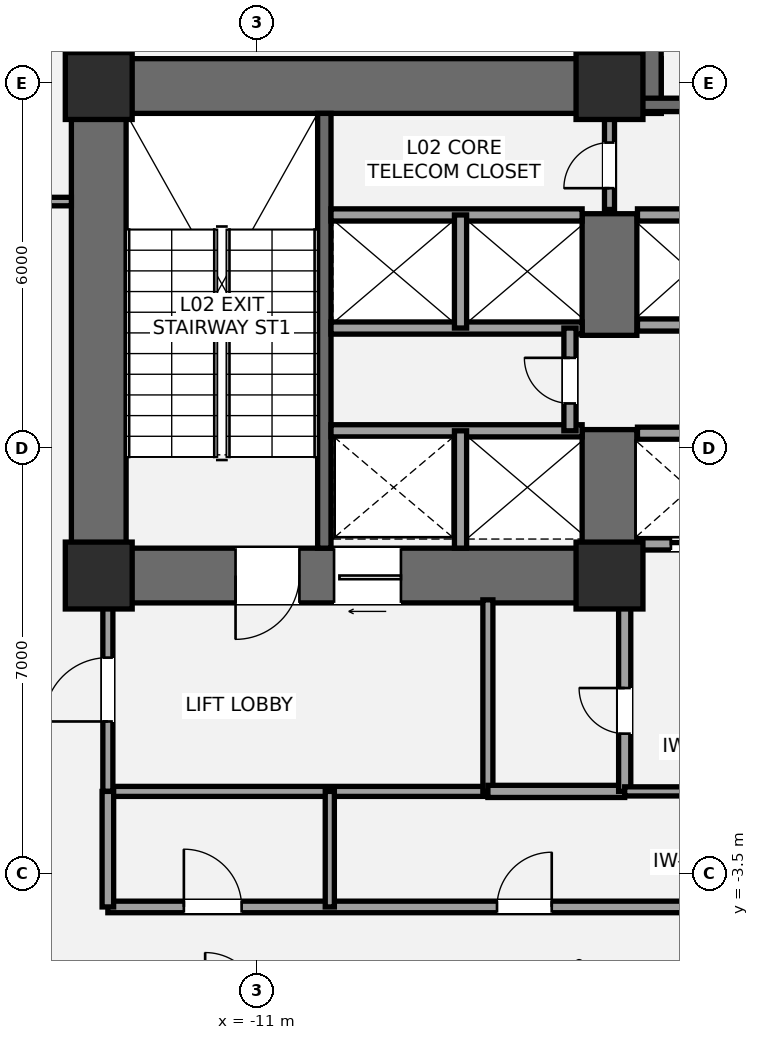
"""IFC4 building model, lengths in metres.
Left out: names, types, materials, properties, quantities, classifications, styles, units other than length and angle.
Written with IfcOpenShell. Run it as: python <this file> out.ifc"""

import sys

from ifc_helpers import new_model, si_unit, direction, frame, frame_2d, origin, origin_2d, place, context, subcontext, project, spatial, rectangle, extrude, element, fill, save


model = new_model("IFC4")
c1 = context("Model", 3, precision=1e-05, world=origin(), true_north=direction((0.0, 1.0)))
c2 = subcontext(c1, "Body", "Model", "MODEL_VIEW")
j1 = project(units=[si_unit("LENGTHUNIT", "METRE"), si_unit("PLANEANGLEUNIT", "RADIAN")], contexts=[c1])
p1 = place(None, origin())
s1 = spatial("IfcSite", under=j1, at=p1, CompositionType="ELEMENT")
p2 = place(p1, origin())
s2 = spatial("IfcBuilding", under=s1, at=p2, CompositionType="ELEMENT")
p3 = place(p2, frame((0.0, 0.0, 10.2)))
s3 = spatial("IfcBuildingStorey", under=s2, at=p3, CompositionType="ELEMENT", Elevation=10.2)
p4 = place(p3, frame((-13.6, 0.95, 0.0), z_axis=(0.0, 0.0, 1.0), x_axis=(0.0, 1.0, 0.0)))
e1 = element("IfcWall", 1, at=p4, inside=s3, PredefinedType="SHEAR", context=c2, shape_type="SweptSolid", body=[
    extrude(rectangle(XDim=8.95, YDim=0.9, at=frame_2d((4.475, 0.0))), origin(), (0.0, 0.0, 1.0), 4.2),
])
p5 = place(p3, frame((-14.05, 9.45, 0.0), z_axis=(0.0, 0.0, 1.0), x_axis=(1.0, 0.0, 0.0)))
e2 = element("IfcWall", 2, at=p5, inside=s3, PredefinedType="SHEAR", context=c2, shape_type="SweptSolid", body=[
    extrude(rectangle(XDim=9.7, YDim=0.9, at=frame_2d((4.85, 0.0))), origin(), (0.0, 0.0, 1.0), 4.2),
])
p6 = place(p3, frame((-4.75, 1.4, 0.0), z_axis=(0.0, 0.0, 1.0), x_axis=(-1.0, 0.0, 0.0)))
e3 = element("IfcWall", 3, at=p6, inside=s3, PredefinedType="SHEAR", context=c2, shape_type="SweptSolid", body=[
    extrude(rectangle(XDim=9.3, YDim=0.9, at=frame_2d((4.65, 0.0))), origin(), (0.0, 0.0, 1.0), 4.2),
])
p7 = place(p6, frame((5.55, 0.0, 0.0)))
e4 = element("IfcOpeningElement", 4, at=p7, cuts=e3, PredefinedType="OPENING", context=c2, shape_type="SweptSolid", body=[
    extrude(rectangle(XDim=1.05, YDim=2.15, at=frame_2d((0.525, 1.075))), frame((0.0, 0.46, 0.0), z_axis=(0.0, -1.0, 0.0), x_axis=(1.0, 0.0, 0.0)), (0.0, 0.0, 1.0), 0.92),
])
p8 = place(p6, frame((3.88, 0.0, 0.0)))
e5 = element("IfcOpeningElement", 5, at=p8, cuts=e3, PredefinedType="OPENING", context=c2, shape_type="SweptSolid", body=[
    extrude(rectangle(XDim=1.1, YDim=2.2, at=frame_2d((0.55, 1.1))), frame((0.0, 0.46, 0.0), z_axis=(0.0, -1.0, 0.0), x_axis=(1.0, 0.0, 0.0)), (0.0, 0.0, 1.0), 0.92),
])
p9 = place(p3, frame((-5.2, 0.95, 0.0), z_axis=(0.0, 0.0, 1.0), x_axis=(0.0, 1.0, 0.0)))
e6 = element("IfcWall", 6, at=p9, inside=s3, PredefinedType="SHEAR", context=c2, shape_type="SweptSolid", body=[
    extrude(rectangle(XDim=2.85, YDim=0.9, at=frame_2d((1.425, 0.0))), origin(), (0.0, 0.0, 1.0), 4.2),
])
p10 = place(p3, frame((-5.2, 5.35, 0.0), z_axis=(0.0, 0.0, 1.0), x_axis=(0.0, 1.0, 0.0)))
e7 = element("IfcWall", 7, at=p10, inside=s3, PredefinedType="SHEAR", context=c2, shape_type="SweptSolid", body=[
    extrude(rectangle(XDim=2.0, YDim=0.9, at=frame_2d((1.0, 0.0))), origin(), (0.0, 0.0, 1.0), 4.2),
])
p11 = place(p3, frame((-9.89, 1.85, 0.0), z_axis=(0.0, 0.0, 1.0), x_axis=(0.0, 1.0, 0.0)))
e8 = element("IfcWall", 8, at=p11, inside=s3, PredefinedType="SHEAR", context=c2, shape_type="SweptSolid", body=[
    extrude(rectangle(XDim=7.15, YDim=0.22, at=frame_2d((3.575, 0.0))), origin(), (0.0, 0.0, 1.0), 4.2),
])
p12 = place(p3, frame((-4.8, 9.0, 0.0), z_axis=(0.0, 0.0, 1.0), x_axis=(0.0, 1.0, 0.0)))
e9 = element("IfcWall", 9, at=p12, inside=s3, PredefinedType="SHEAR", context=c2, shape_type="SweptSolid", body=[
    extrude(rectangle(XDim=4.3, YDim=0.9, at=frame_2d((2.15, 0.0))), origin(), (0.0, 0.0, 1.0), 4.2),
])
p13 = place(p3, frame((-4.7, 9.14, 0.0), z_axis=(0.0, 0.0, 1.0), x_axis=(1.0, 0.0, 0.0)))
e10 = element("IfcWall", 10, at=p13, inside=s3, PredefinedType="SHEAR", context=c2, shape_type="SweptSolid", body=[
    extrude(rectangle(XDim=9.3, YDim=0.22, at=frame_2d((4.65, 0.0))), origin(), (0.0, 0.0, 1.0), 4.2),
])
p14 = place(p13, frame((1.15, 0.0, 0.0)))
e11 = element("IfcOpeningElement", 11, at=p14, cuts=e10, PredefinedType="OPENING", context=c2, shape_type="SweptSolid", body=[
    extrude(rectangle(XDim=1.05, YDim=2.15, at=frame_2d((0.525, 1.075))), frame((0.0, 0.12, 0.0), z_axis=(0.0, -1.0, 0.0), x_axis=(1.0, 0.0, 0.0)), (0.0, 0.0, 1.0), 0.24),
])
for number, where, z_axis, x_axis in (
    (12, (-13.6, 1.4, 0.0), (0.0, 0.0, 1.0), (1.0, 0.0, 0.0)),
    (13, (-13.6, 9.45, 0.0), (0.0, 0.0, 1.0), (1.0, 0.0, 0.0)),
    (14, (-5.2, 1.4, 0.0), (0.0, 0.0, 1.0), (1.0, 0.0, 0.0)),
    (15, (-5.2, 9.45, 0.0), (0.0, 0.0, 1.0), (1.0, 0.0, 0.0)),
):
    element("IfcColumn", number, at=place(p3, frame(where, z_axis=z_axis, x_axis=x_axis)), inside=s3, PredefinedType="COLUMN", context=c2, shape_type="SweptSolid", body=[
        extrude(rectangle(XDim=1.1, YDim=1.1, at=origin_2d()), origin(), (0.0, 0.0, 1.0), 4.2),
    ])
p15 = place(p3, frame((-13.45, -2.15, 0.0), z_axis=(0.0, 0.0, 1.0), x_axis=(1.0, 0.0, 0.0)))
e16 = element("IfcWall", 16, at=p15, inside=s3, PredefinedType="PARTITIONING", context=c2, shape_type="SweptSolid", body=[
    extrude(rectangle(XDim=6.25, YDim=0.165, at=frame_2d((3.125, 0.0))), origin(), (0.0, 0.0, 1.0), 3.98),
])
p16 = place(p3, frame((-13.45, -2.15, 0.0), z_axis=(0.0, 0.0, 1.0), x_axis=(0.0, 1.0, 0.0)))
e17 = element("IfcWall", 17, at=p16, inside=s3, PredefinedType="PARTITIONING", context=c2, shape_type="SweptSolid", body=[
    extrude(rectangle(XDim=3.15, YDim=0.165, at=frame_2d((1.575, 0.0))), origin(), (0.0, 0.0, 1.0), 3.433),
])
p17 = place(p16, frame((1.15, 0.0, 0.0)))
e18 = element("IfcOpeningElement", 18, at=p17, cuts=e17, PredefinedType="OPENING", context=c2, shape_type="SweptSolid", body=[
    extrude(rectangle(XDim=1.05, YDim=2.15, at=frame_2d((0.525, 1.075))), frame((0.0, 0.093, 0.0), z_axis=(0.0, -1.0, 0.0), x_axis=(1.0, 0.0, 0.0)), (0.0, 0.0, 1.0), 0.185),
])
p18 = place(p3, frame((-7.2, -2.15, 0.0), z_axis=(0.0, 0.0, 1.0), x_axis=(0.0, 1.0, 0.0)))
e19 = element("IfcWall", 19, at=p18, inside=s3, PredefinedType="PARTITIONING", context=c2, shape_type="SweptSolid", body=[
    extrude(rectangle(XDim=3.15, YDim=0.165, at=frame_2d((1.575, 0.0))), origin(), (0.0, 0.0, 1.0), 3.98),
])
p19 = place(p3, frame((-7.2, -2.15, 0.0), z_axis=(0.0, 0.0, 1.0), x_axis=(1.0, 0.0, 0.0)))
e20 = element("IfcWall", 20, at=p19, inside=s3, PredefinedType="SOLIDWALL", context=c2, shape_type="SweptSolid", body=[
    extrude(rectangle(XDim=2.25, YDim=0.2, at=frame_2d((1.125, 0.0))), origin(), (0.0, 0.0, 1.0), 3.98),
])
p20 = place(p3, frame((-4.95, -2.15, 0.0), z_axis=(0.0, 0.0, 1.0), x_axis=(0.0, 1.0, 0.0)))
e21 = element("IfcWall", 21, at=p20, inside=s3, PredefinedType="SOLIDWALL", context=c2, shape_type="SweptSolid", body=[
    extrude(rectangle(XDim=3.15, YDim=0.2, at=frame_2d((1.575, 0.0))), origin(), (0.0, 0.0, 1.0), 3.348),
])
p21 = place(p20, frame((0.95, 0.0, 0.0)))
e22 = element("IfcOpeningElement", 22, at=p21, cuts=e21, PredefinedType="OPENING", context=c2, shape_type="SweptSolid", body=[
    extrude(rectangle(XDim=0.75, YDim=2.1, at=frame_2d((0.375, 1.05))), frame((0.0, 0.11, 0.0), z_axis=(0.0, -1.0, 0.0), x_axis=(1.0, 0.0, 0.0)), (0.0, 0.0, 1.0), 0.22),
])
p22 = place(p3, frame((-9.78, 3.78, 0.0), z_axis=(0.0, 0.0, 1.0), x_axis=(1.0, 0.0, 0.0)))
e23 = element("IfcWall", 23, at=p22, inside=s3, PredefinedType="SOLIDWALL", context=c2, shape_type="SweptSolid", body=[
    extrude(rectangle(XDim=4.13, YDim=0.2, at=frame_2d((2.065, 0.0))), origin(), (0.0, 0.0, 1.0), 3.98),
])
p23 = place(p3, frame((-7.65, 1.85, 0.0), z_axis=(0.0, 0.0, 1.0), x_axis=(0.0, 1.0, 0.0)))
e24 = element("IfcWall", 24, at=p23, inside=s3, PredefinedType="SOLIDWALL", context=c2, shape_type="SweptSolid", body=[
    extrude(rectangle(XDim=1.93, YDim=0.2, at=frame_2d((0.965, 0.0))), origin(), (0.0, 0.0, 1.0), 3.98),
])
for number, where, z_axis, x_axis in (
    (25, (-9.78, 5.47, 0.0), (0.0, 0.0, 1.0), (1.0, 0.0, 0.0)),
    (26, (-9.78, 7.33, 0.0), (0.0, 0.0, 1.0), (1.0, 0.0, 0.0)),
):
    element("IfcWall", number, at=place(p3, frame(where, z_axis=z_axis, x_axis=x_axis)), inside=s3, PredefinedType="SOLIDWALL", context=c2, shape_type="SweptSolid", body=[
        extrude(rectangle(XDim=4.13, YDim=0.2, at=frame_2d((2.065, 0.0))), origin(), (0.0, 0.0, 1.0), 3.98),
    ])
p24 = place(p3, frame((-7.65, 5.47, 0.0), z_axis=(0.0, 0.0, 1.0), x_axis=(0.0, 1.0, 0.0)))
e27 = element("IfcWall", 27, at=p24, inside=s3, PredefinedType="SOLIDWALL", context=c2, shape_type="SweptSolid", body=[
    extrude(rectangle(XDim=1.86, YDim=0.2, at=frame_2d((0.93, 0.0))), origin(), (0.0, 0.0, 1.0), 3.98),
])
p25 = place(p3, frame((-5.85, 3.78, 0.0), z_axis=(0.0, 0.0, 1.0), x_axis=(0.0, 1.0, 0.0)))
e28 = element("IfcWall", 28, at=p25, inside=s3, PredefinedType="SOLIDWALL", context=c2, shape_type="SweptSolid", body=[
    extrude(rectangle(XDim=1.69, YDim=0.2, at=frame_2d((0.845, 0.0))), origin(), (0.0, 0.0, 1.0), 3.98),
])
p26 = place(p25, frame((0.45, 0.0, 0.0)))
e29 = element("IfcOpeningElement", 29, at=p26, cuts=e28, PredefinedType="OPENING", context=c2, shape_type="SweptSolid", body=[
    extrude(rectangle(XDim=0.75, YDim=2.1, at=frame_2d((0.375, 1.05))), frame((0.0, 0.11, 0.0), z_axis=(0.0, -1.0, 0.0), x_axis=(1.0, 0.0, 0.0)), (0.0, 0.0, 1.0), 0.22),
])
p27 = place(p3, frame((-4.74, 1.92, 0.0), z_axis=(0.0, 0.0, 1.0), x_axis=(1.0, 0.0, 0.0)))
e30 = element("IfcWall", 30, at=p27, inside=s3, PredefinedType="SOLIDWALL", context=c2, shape_type="SweptSolid", body=[
    extrude(rectangle(XDim=3.86, YDim=0.2, at=frame_2d((1.93, 0.0))), origin(), (0.0, 0.0, 1.0), 2.97),
])
p28 = place(p27, frame((0.55, 0.0, 0.0)))
e31 = element("IfcOpeningElement", 31, at=p28, cuts=e30, PredefinedType="OPENING", context=c2, shape_type="SweptSolid", body=[
    extrude(rectangle(XDim=1.1, YDim=2.2, at=frame_2d((0.55, 1.1))), frame((0.0, 0.11, 0.0), z_axis=(0.0, -1.0, 0.0), x_axis=(1.0, 0.0, 0.0)), (0.0, 0.0, 1.0), 0.22),
])
p29 = place(p27, frame((2.55, 0.0, 0.0)))
e32 = element("IfcOpeningElement", 32, at=p29, cuts=e30, PredefinedType="OPENING", context=c2, shape_type="SweptSolid", body=[
    extrude(rectangle(XDim=1.1, YDim=2.2, at=frame_2d((0.55, 1.1))), frame((0.0, 0.11, 0.0), z_axis=(0.0, -1.0, 0.0), x_axis=(1.0, 0.0, 0.0)), (0.0, 0.0, 1.0), 0.22),
])
for number, where, z_axis, x_axis in (
    (33, (-4.74, 3.74, 0.0), (0.0, 0.0, 1.0), (1.0, 0.0, 0.0)),
    (34, (-4.74, 5.52, 0.0), (0.0, 0.0, 1.0), (1.0, 0.0, 0.0)),
    (35, (-4.74, 7.33, 0.0), (0.0, 0.0, 1.0), (1.0, 0.0, 0.0)),
):
    element("IfcWall", number, at=place(p3, frame(where, z_axis=z_axis, x_axis=x_axis)), inside=s3, PredefinedType="SOLIDWALL", context=c2, shape_type="SweptSolid", body=[
        extrude(rectangle(XDim=3.86, YDim=0.2, at=frame_2d((1.93, 0.0))), origin(), (0.0, 0.0, 1.0), 3.98),
    ])
p30 = place(p3, frame((-5.2, 7.42, 0.0), z_axis=(0.0, 0.0, 1.0), x_axis=(0.0, 1.0, 0.0)))
e36 = element("IfcWall", 36, at=p30, inside=s3, PredefinedType="PARTITIONING", context=c2, shape_type="SweptSolid", body=[
    extrude(rectangle(XDim=1.58, YDim=0.165, at=frame_2d((0.79, 0.0))), origin(), (0.0, 0.0, 1.0), 3.98),
])
p31 = place(p30, frame((0.35, 0.0, 0.0)))
e37 = element("IfcOpeningElement", 37, at=p31, cuts=e36, PredefinedType="OPENING", context=c2, shape_type="SweptSolid", body=[
    extrude(rectangle(XDim=0.75, YDim=2.1, at=frame_2d((0.375, 1.05))), frame((0.0, 0.093, 0.0), z_axis=(0.0, -1.0, 0.0), x_axis=(1.0, 0.0, 0.0)), (0.0, 0.0, 1.0), 0.185),
])
p32 = place(p3, frame((-13.45, -4.05, 0.0), z_axis=(0.0, 0.0, 1.0), x_axis=(1.0, 0.0, 0.0)))
e38 = element("IfcWall", 38, at=p32, inside=s3, PredefinedType="PLUMBINGWALL", context=c2, shape_type="SweptSolid", body=[
    extrude(rectangle(XDim=11.35, YDim=0.19, at=frame_2d((5.675, 0.0))), origin(), (0.0, 0.0, 1.0), 3.507),
])
p33 = place(p32, frame((1.25, 0.0, 0.0)))
e39 = element("IfcOpeningElement", 39, at=p33, cuts=e38, PredefinedType="OPENING", context=c2, shape_type="SweptSolid", body=[
    extrude(rectangle(XDim=0.95, YDim=2.15, at=frame_2d((0.475, 1.075))), frame((0.0, 0.105, 0.0), z_axis=(0.0, -1.0, 0.0), x_axis=(1.0, 0.0, 0.0)), (0.0, 0.0, 1.0), 0.21),
])
p34 = place(p32, frame((6.4, 0.0, 0.0)))
e40 = element("IfcOpeningElement", 40, at=p34, cuts=e38, PredefinedType="OPENING", context=c2, shape_type="SweptSolid", body=[
    extrude(rectangle(XDim=0.9, YDim=2.1, at=frame_2d((0.45, 1.05))), frame((0.0, 0.105, 0.0), z_axis=(0.0, -1.0, 0.0), x_axis=(1.0, 0.0, 0.0)), (0.0, 0.0, 1.0), 0.21),
])
p35 = place(p3, frame((-4.95, -2.15, 0.0), z_axis=(0.0, 0.0, 1.0), x_axis=(1.0, 0.0, 0.0)))
e41 = element("IfcWall", 41, at=p35, inside=s3, PredefinedType="PLUMBINGWALL", context=c2, shape_type="SweptSolid", body=[
    extrude(rectangle(XDim=2.85, YDim=0.15, at=frame_2d((1.425, 0.0))), origin(), (0.0, 0.0, 1.0), 3.98),
])
p36 = place(p3, frame((-13.45, -4.05, 0.0), z_axis=(0.0, 0.0, 1.0), x_axis=(0.0, 1.0, 0.0)))
e42 = element("IfcWall", 42, at=p36, inside=s3, PredefinedType="PLUMBINGWALL", context=c2, shape_type="SweptSolid", body=[
    extrude(rectangle(XDim=1.9, YDim=0.19, at=frame_2d((0.95, 0.0))), origin(), (0.0, 0.0, 1.0), 3.98),
])
p37 = place(p3, frame((-9.8, -4.05, 0.0), z_axis=(0.0, 0.0, 1.0), x_axis=(0.0, 1.0, 0.0)))
e43 = element("IfcWall", 43, at=p37, inside=s3, PredefinedType="PLUMBINGWALL", context=c2, shape_type="SweptSolid", body=[
    extrude(rectangle(XDim=1.9, YDim=0.15, at=frame_2d((0.95, 0.0))), origin(), (0.0, 0.0, 1.0), 3.98),
])
p38 = place(p3, frame((-16.4, 7.55, 0.0), z_axis=(0.0, 0.0, 1.0), x_axis=(1.0, 0.0, 0.0)))
e44 = element("IfcWall", 44, at=p38, inside=s3, PredefinedType="PARTITIONING", context=c2, shape_type="SweptSolid", body=[
    extrude(rectangle(XDim=2.35, YDim=0.14, at=frame_2d((1.175, 0.0))), origin(), (0.0, 0.0, 1.0), 3.433),
])
p39 = place(p38, frame((0.32, 0.0, 0.0)))
e45 = element("IfcOpeningElement", 45, at=p39, cuts=e44, PredefinedType="OPENING", context=c2, shape_type="SweptSolid", body=[
    extrude(rectangle(XDim=0.92, YDim=2.15, at=frame_2d((0.46, 1.075))), frame((0.0, 0.08, 0.0), z_axis=(0.0, -1.0, 0.0), x_axis=(1.0, 0.0, 0.0)), (0.0, 0.0, 1.0), 0.16),
])
p40 = place(p7, origin())
e46 = element("IfcDoor", 46, at=p40, inside=s3, OperationType="SINGLE_SWING_RIGHT", PredefinedType="DOOR", context=c2, shape_type="SweptSolid", body=[
    extrude(rectangle(XDim=1.05, YDim=2.15, at=frame_2d((0.525, 1.075))), frame((0.0, 0.025, 0.0), z_axis=(0.0, -1.0, 0.0), x_axis=(1.0, 0.0, 0.0)), (0.0, 0.0, 1.0), 0.05),
])
fill(e4, e46)
p41 = place(p17, origin())
e47 = element("IfcDoor", 47, at=p41, inside=s3, OperationType="SINGLE_SWING_LEFT", PredefinedType="DOOR", context=c2, shape_type="SweptSolid", body=[
    extrude(rectangle(XDim=1.05, YDim=2.15, at=frame_2d((0.525, 1.075))), frame((0.0, 0.025, 0.0), z_axis=(0.0, -1.0, 0.0), x_axis=(1.0, 0.0, 0.0)), (0.0, 0.0, 1.0), 0.05),
])
fill(e18, e47)
p42 = place(p21, origin())
e48 = element("IfcDoor", 48, at=p42, inside=s3, OperationType="SINGLE_SWING_RIGHT", PredefinedType="DOOR", context=c2, shape_type="SweptSolid", body=[
    extrude(rectangle(XDim=0.75, YDim=2.1, at=frame_2d((0.375, 1.05))), frame((0.0, 0.025, 0.0), z_axis=(0.0, -1.0, 0.0), x_axis=(1.0, 0.0, 0.0)), (0.0, 0.0, 1.0), 0.05),
])
fill(e22, e48)
p43 = place(p8, origin())
e49 = element("IfcDoor", 49, at=p43, inside=s3, OperationType="SLIDING_TO_LEFT", PredefinedType="DOOR", context=c2, shape_type="SweptSolid", body=[
    extrude(rectangle(XDim=1.1, YDim=2.2, at=frame_2d((0.55, 1.1))), frame((0.0, 0.025, 0.0), z_axis=(0.0, -1.0, 0.0), x_axis=(1.0, 0.0, 0.0)), (0.0, 0.0, 1.0), 0.05),
])
fill(e5, e49)
p44 = place(p26, origin())
e50 = element("IfcDoor", 50, at=p44, inside=s3, OperationType="SINGLE_SWING_RIGHT", PredefinedType="DOOR", context=c2, shape_type="SweptSolid", body=[
    extrude(rectangle(XDim=0.75, YDim=2.1, at=frame_2d((0.375, 1.05))), frame((0.0, 0.025, 0.0), z_axis=(0.0, -1.0, 0.0), x_axis=(1.0, 0.0, 0.0)), (0.0, 0.0, 1.0), 0.05),
])
fill(e29, e50)
p45 = place(p28, origin())
e51 = element("IfcDoor", 51, at=p45, inside=s3, OperationType="SLIDING_TO_LEFT", PredefinedType="DOOR", context=c2, shape_type="SweptSolid", body=[
    extrude(rectangle(XDim=1.1, YDim=2.2, at=frame_2d((0.55, 1.1))), frame((0.0, 0.025, 0.0), z_axis=(0.0, -1.0, 0.0), x_axis=(1.0, 0.0, 0.0)), (0.0, 0.0, 1.0), 0.05),
])
fill(e31, e51)
p46 = place(p31, origin())
e52 = element("IfcDoor", 52, at=p46, inside=s3, OperationType="SINGLE_SWING_LEFT", PredefinedType="DOOR", context=c2, shape_type="SweptSolid", body=[
    extrude(rectangle(XDim=0.75, YDim=2.1, at=frame_2d((0.375, 1.05))), frame((0.0, 0.025, 0.0), z_axis=(0.0, -1.0, 0.0), x_axis=(1.0, 0.0, 0.0)), (0.0, 0.0, 1.0), 0.05),
])
fill(e37, e52)
p47 = place(p33, origin())
e53 = element("IfcDoor", 53, at=p47, inside=s3, OperationType="SINGLE_SWING_LEFT", PredefinedType="DOOR", context=c2, shape_type="SweptSolid", body=[
    extrude(rectangle(XDim=0.95, YDim=2.15, at=frame_2d((0.475, 1.075))), frame((0.0, 0.025, 0.0), z_axis=(0.0, -1.0, 0.0), x_axis=(1.0, 0.0, 0.0)), (0.0, 0.0, 1.0), 0.05),
])
fill(e39, e53)
p48 = place(p34, origin())
e54 = element("IfcDoor", 54, at=p48, inside=s3, OperationType="SINGLE_SWING_RIGHT", PredefinedType="DOOR", context=c2, shape_type="SweptSolid", body=[
    extrude(rectangle(XDim=0.9, YDim=2.1, at=frame_2d((0.45, 1.05))), frame((0.0, 0.025, 0.0), z_axis=(0.0, -1.0, 0.0), x_axis=(1.0, 0.0, 0.0)), (0.0, 0.0, 1.0), 0.05),
])
fill(e40, e54)
save(model, sys.argv[1])
